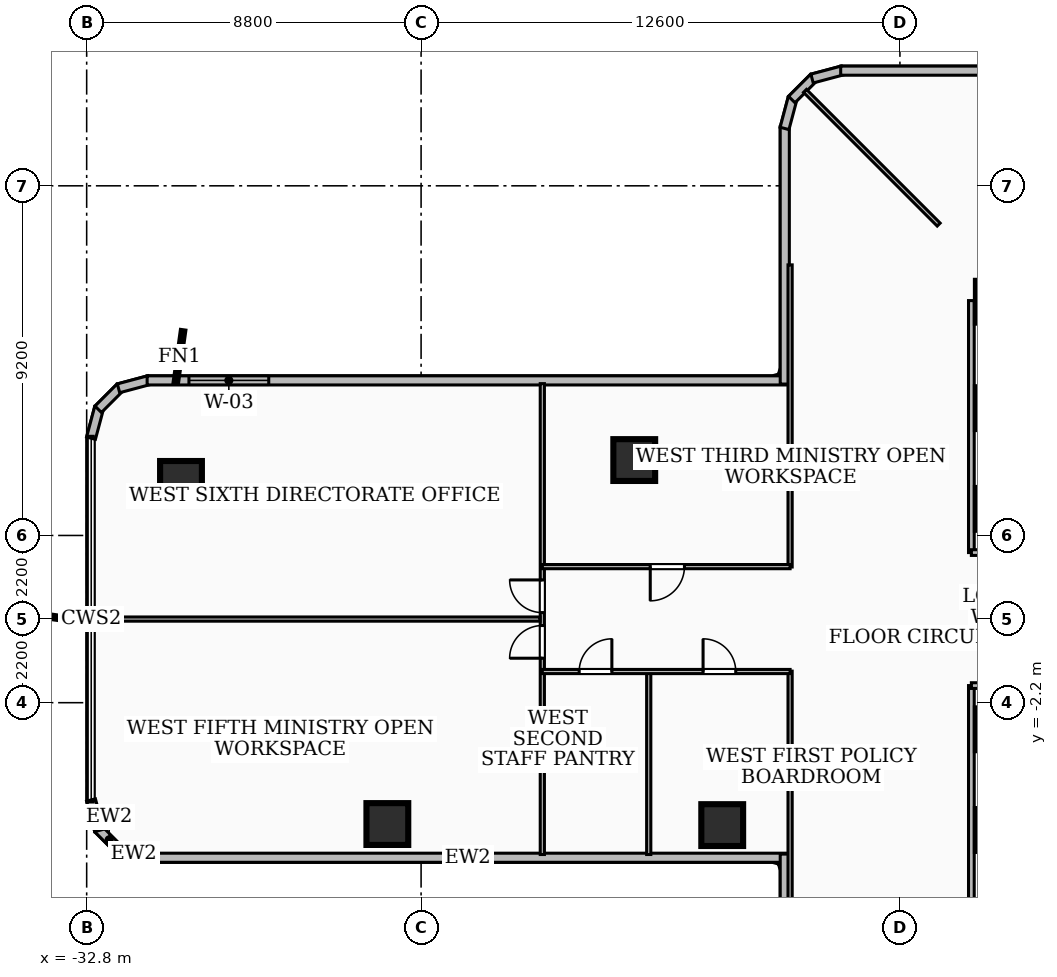
"""IFC4 building model, lengths in metres.
Left out: names, types, materials, properties, quantities, classifications, styles, units other than length and angle.
Written with IfcOpenShell. Run it as: python <this file> out.ifc"""

import sys

from ifc_helpers import new_model, si_unit, direction, frame, frame_2d, origin, origin_2d, place, context, subcontext, project, spatial, rectangle, extrude, element, fill, save


model = new_model("IFC4")
c1 = context("Model", 3, precision=1e-05, world=origin(), true_north=direction((0.0, 1.0)))
c2 = subcontext(c1, "Body", "Model", "MODEL_VIEW")
j1 = project(units=[si_unit("LENGTHUNIT", "METRE"), si_unit("PLANEANGLEUNIT", "RADIAN")], contexts=[c1])
p1 = place(None, origin())
s1 = spatial("IfcSite", under=j1, at=p1, CompositionType="ELEMENT")
p2 = place(p1, origin())
s2 = spatial("IfcBuilding", under=s1, at=p2, CompositionType="ELEMENT")
p3 = place(p2, frame((0.0, 0.0, 31.68)))
s3 = spatial("IfcBuildingStorey", under=s2, at=p3, CompositionType="ELEMENT", Elevation=31.68)
for number, where, z_axis, x_axis in (
    (1, (-8.85, -5.55, 0.0), (0.0, 0.0, 1.0), (1.0, 0.0, 0.0)),
    (2, (-8.85, -2.9, 0.0), (0.0, 0.0, 1.0), (1.0, 0.0, 0.0)),
    (3, (-8.85, 2.9, 0.0), (0.0, 0.0, 1.0), (1.0, 0.0, 0.0)),
    (4, (-8.85, 5.55, 0.0), (0.0, 0.0, 1.0), (1.0, 0.0, 0.0)),
    (5, (-8.85, 8.35, 0.0), (0.0, 0.0, 1.0), (1.0, 0.0, 0.0)),
    (6, (-18.391, 4.184, 0.0), (0.0, 0.0, 1.0), (1.0, 0.0, 0.0)),
    (7, (-16.076, -5.421, 0.0), (0.0, 0.0, 1.0), (1.0, 0.0, 0.0)),
    (8, (-30.318, 3.609, 0.0), (0.0, 0.0, 1.0), (1.0, 0.0, 0.0)),
    (9, (-24.888, -5.393, 0.0), (0.0, 0.0, 1.0), (1.0, 0.0, 0.0)),
):
    element("IfcColumn", number, at=place(p3, frame(where, z_axis=z_axis, x_axis=x_axis)), inside=s3, PredefinedType="COLUMN", context=c2, shape_type="SweptSolid", body=[
        extrude(rectangle(XDim=1.1, YDim=1.1, at=origin_2d()), origin(), (0.0, 0.0, 1.0), 3.6),
    ])
p4 = place(p3, frame((-14.334, -6.28, 0.0), z_axis=(0.0, 0.0, 1.0), x_axis=(-1.0, 0.0, 0.0)))
e10 = element("IfcWall", 10, at=p4, inside=s3, PredefinedType="SOLIDWALL", context=c2, shape_type="SweptSolid", body=[
    extrude(rectangle(XDim=16.875, YDim=0.24, at=frame_2d((8.438, 0.0))), origin(), (0.0, 0.0, 1.0), 2.644),
])
p5 = place(p3, frame((-31.16, -6.286, 0.0), z_axis=(0.0, 0.0, 1.0), x_axis=(-0.966234939601, 0.25766265056, 0.0)))
e11 = element("IfcWall", 11, at=p5, inside=s3, PredefinedType="SOLIDWALL", context=c2, shape_type="SweptSolid", body=[
    extrude(rectangle(XDim=0.83, YDim=0.24, at=frame_2d((0.415, 0.0))), origin(), (0.0, 0.0, 1.0), 3.34),
])
p6 = place(p3, frame((-31.92, -6.096, 0.0), z_axis=(0.0, 0.0, 1.0), x_axis=(-0.707256607812, 0.706956922808, 0.0)))
e12 = element("IfcWall", 12, at=p6, inside=s3, PredefinedType="SOLIDWALL", context=c2, shape_type="SweptSolid", body=[
    extrude(rectangle(XDim=0.815, YDim=0.24, at=frame_2d((0.407, 0.0))), origin(), (0.0, 0.0, 1.0), 3.34),
])
for number, where, z_axis, x_axis in (
    (13, (-32.472, -5.562, 0.0), (0.0, 0.0, 1.0), (-0.258, 0.966, 0.0)),
    (14, (-32.686, 4.76, 0.0), (0.0, 0.0, 1.0), (0.258, 0.966, 0.0)),
):
    element("IfcWall", number, at=place(p3, frame(where, z_axis=z_axis, x_axis=x_axis)), inside=s3, PredefinedType="SOLIDWALL", context=c2, shape_type="SweptSolid", body=[
        extrude(rectangle(XDim=0.83, YDim=0.24, at=frame_2d((0.415, 0.0))), origin(), (0.0, 0.0, 1.0), 3.34),
    ])
p7 = place(p3, frame((-32.496, 5.52, 0.0), z_axis=(0.0, 0.0, 1.0), x_axis=(0.707256607812, 0.706956922808, 0.0)))
e15 = element("IfcWall", 15, at=p7, inside=s3, PredefinedType="SOLIDWALL", context=c2, shape_type="SweptSolid", body=[
    extrude(rectangle(XDim=0.815, YDim=0.24, at=frame_2d((0.407, 0.0))), origin(), (0.0, 0.0, 1.0), 3.34),
])
p8 = place(p3, frame((-31.962, 6.072, 0.0), z_axis=(0.0, 0.0, 1.0), x_axis=(0.966234939601, 0.25766265056, 0.0)))
e16 = element("IfcWall", 16, at=p8, inside=s3, PredefinedType="SOLIDWALL", context=c2, shape_type="SweptSolid", body=[
    extrude(rectangle(XDim=0.83, YDim=0.24, at=frame_2d((0.415, 0.0))), origin(), (0.0, 0.0, 1.0), 3.34),
])
p9 = place(p3, frame((-31.209, 6.28, 0.0), z_axis=(0.0, 0.0, 1.0), x_axis=(1.0, 0.0, 0.0)))
e17 = element("IfcWall", 17, at=p9, inside=s3, PredefinedType="SOLIDWALL", context=c2, shape_type="SweptSolid", body=[
    extrude(rectangle(XDim=16.875, YDim=0.24, at=frame_2d((8.438, 0.0))), origin(), (0.0, 0.0, 1.0), 3.34),
])
p10 = place(p9, frame((1.1, 0.0, 0.85)))
e18 = element("IfcOpeningElement", 18, at=p10, cuts=e17, PredefinedType="OPENING", context=c2, shape_type="SweptSolid", body=[
    extrude(rectangle(XDim=2.1, YDim=2.0, at=frame_2d((1.05, 1.0))), frame((0.0, 0.13, 0.0), z_axis=(0.0, -1.0, 0.0), x_axis=(1.0, 0.0, 0.0)), (0.0, 0.0, 1.0), 0.26),
])
p11 = place(p3, frame((-14.43, 6.184, 0.0), z_axis=(0.0, 0.0, 1.0), x_axis=(0.0, 1.0, 0.0)))
e19 = element("IfcWall", 19, at=p11, inside=s3, PredefinedType="SOLIDWALL", context=c2, shape_type="SweptSolid", body=[
    extrude(rectangle(XDim=6.775, YDim=0.24, at=frame_2d((3.387, 0.0))), origin(), (0.0, 0.0, 1.0), 3.34),
])
p12 = place(p3, frame((-14.436, 12.91, 0.0), z_axis=(0.0, 0.0, 1.0), x_axis=(0.257937227116, 0.966161677396, 0.0)))
e20 = element("IfcWall", 20, at=p12, inside=s3, PredefinedType="SOLIDWALL", context=c2, shape_type="SweptSolid", body=[
    extrude(rectangle(XDim=0.83, YDim=0.24, at=frame_2d((0.415, 0.0))), origin(), (0.0, 0.0, 1.0), 3.34),
])
p13 = place(p3, frame((-14.246, 13.67, 0.0), z_axis=(0.0, 0.0, 1.0), x_axis=(0.707106781187, 0.707106781187, 0.0)))
e21 = element("IfcWall", 21, at=p13, inside=s3, PredefinedType="SOLIDWALL", context=c2, shape_type="SweptSolid", body=[
    extrude(rectangle(XDim=0.815, YDim=0.24, at=frame_2d((0.407, 0.0))), origin(), (0.0, 0.0, 1.0), 3.34),
])
p14 = place(p3, frame((-13.712, 14.222, 0.0), z_axis=(0.0, 0.0, 1.0), x_axis=(0.966161677396, 0.257937227116, 0.0)))
e22 = element("IfcWall", 22, at=p14, inside=s3, PredefinedType="SOLIDWALL", context=c2, shape_type="SweptSolid", body=[
    extrude(rectangle(XDim=0.83, YDim=0.24, at=frame_2d((0.415, 0.0))), origin(), (0.0, 0.0, 1.0), 3.34),
])
p15 = place(p3, frame((-12.959, 14.43, 0.0), z_axis=(0.0, 0.0, 1.0), x_axis=(1.0, 0.0, 0.0)))
e23 = element("IfcWall", 23, at=p15, inside=s3, PredefinedType="SOLIDWALL", context=c2, shape_type="SweptSolid", body=[
    extrude(rectangle(XDim=6.775, YDim=0.24, at=frame_2d((3.387, 0.0))), origin(), (0.0, 0.0, 1.0), 2.421),
])
p16 = place(p3, frame((-14.43, -12.959, 0.0), z_axis=(0.0, 0.0, 1.0), x_axis=(0.0, 1.0, 0.0)))
e24 = element("IfcWall", 24, at=p16, inside=s3, PredefinedType="SOLIDWALL", context=c2, shape_type="SweptSolid", body=[
    extrude(rectangle(XDim=6.775, YDim=0.24, at=frame_2d((3.387, 0.0))), origin(), (0.0, 0.0, 1.0), 2.644),
])
p17 = place(p3, frame((-9.52, 1.75, 0.0), z_axis=(0.0, 0.0, 1.0), x_axis=(0.0, 1.0, 0.0)))
e25 = element("IfcWall", 25, at=p17, inside=s3, PredefinedType="PARTITIONING", context=c2, shape_type="SweptSolid", body=[
    extrude(rectangle(XDim=6.63, YDim=0.15, at=frame_2d((3.315, 0.0))), origin(), (0.0, 0.0, 1.0), 2.421),
])
p18 = place(p3, frame((-7.85, 1.75, 0.0), z_axis=(0.0, 0.0, 1.0), x_axis=(-1.0, 0.0, 0.0)))
e26 = element("IfcWall", 26, at=p18, inside=s3, PredefinedType="PARTITIONING", context=c2, shape_type="SweptSolid", body=[
    extrude(rectangle(XDim=1.67, YDim=0.15, at=frame_2d((0.835, 0.0))), origin(), (0.0, 0.0, 1.0), 2.405),
])
p19 = place(p3, frame((-9.52, -8.38, 0.0), z_axis=(0.0, 0.0, 1.0), x_axis=(0.0, 1.0, 0.0)))
e27 = element("IfcWall", 27, at=p19, inside=s3, PredefinedType="PARTITIONING", context=c2, shape_type="SweptSolid", body=[
    extrude(rectangle(XDim=6.63, YDim=0.15, at=frame_2d((3.315, 0.0))), origin(), (0.0, 0.0, 1.0), 2.421),
])
p20 = place(p3, frame((-7.85, -1.75, 0.0), z_axis=(0.0, 0.0, 1.0), x_axis=(-1.0, 0.0, 0.0)))
e28 = element("IfcWall", 28, at=p20, inside=s3, PredefinedType="PARTITIONING", context=c2, shape_type="SweptSolid", body=[
    extrude(rectangle(XDim=1.67, YDim=0.15, at=frame_2d((0.835, 0.0))), origin(), (0.0, 0.0, 1.0), 2.405),
])
p21 = place(p3, frame((-10.38, 10.38, 0.0), z_axis=(0.0, 0.0, 1.0), x_axis=(-0.707106781187, 0.707106781187, 0.0)))
e29 = element("IfcWall", 29, at=p21, inside=s3, PredefinedType="PARTITIONING", context=c2, shape_type="SweptSolid", body=[
    extrude(rectangle(XDim=4.975, YDim=0.11, at=frame_2d((2.488, 0.0))), origin(), (0.0, 0.0, 1.0), 3.34),
])
for number, where, z_axis, x_axis in (
    (30, (-14.29, -1.37, 0.0), (0.0, 0.0, 1.0), (0.0, -1.0, 0.0)),
    (31, (-14.29, 9.32, 0.0), (0.0, 0.0, 1.0), (0.0, -1.0, 0.0)),
):
    element("IfcWall", number, at=place(p3, frame(where, z_axis=z_axis, x_axis=x_axis)), inside=s3, PredefinedType="PARTITIONING", context=c2, shape_type="SweptSolid", body=[
        extrude(rectangle(XDim=7.95, YDim=0.11, at=frame_2d((3.975, 0.0))), origin(), (0.0, 0.0, 1.0), 2.421),
    ])
p22 = place(p3, frame((-18.01, -1.4, 0.0), z_axis=(0.0, 0.0, 1.0), x_axis=(0.0, -1.0, 0.0)))
e32 = element("IfcWall", 32, at=p22, inside=s3, PredefinedType="PARTITIONING", context=c2, shape_type="SweptSolid", body=[
    extrude(rectangle(XDim=4.795, YDim=0.11, at=frame_2d((2.397, 0.0))), origin(), (0.0, 0.0, 1.0), 2.421),
])
p23 = place(p3, frame((-20.81, -1.38, 0.0), z_axis=(0.0, 0.0, 1.0), x_axis=(1.0, 0.0, 0.0)))
e33 = element("IfcWall", 33, at=p23, inside=s3, PredefinedType="PARTITIONING", context=c2, shape_type="SweptSolid", body=[
    extrude(rectangle(XDim=6.52, YDim=0.11, at=frame_2d((3.26, 0.0))), origin(), (0.0, 0.0, 1.0), 2.869),
])
p24 = place(p23, frame((4.23, 0.0, 0.0)))
e34 = element("IfcOpeningElement", 34, at=p24, cuts=e33, PredefinedType="OPENING", context=c2, shape_type="SweptSolid", body=[
    extrude(rectangle(XDim=0.86, YDim=2.04, at=frame_2d((0.43, 1.02))), frame((0.0, 0.065, 0.0), z_axis=(0.0, -1.0, 0.0), x_axis=(1.0, 0.0, 0.0)), (0.0, 0.0, 1.0), 0.13),
])
p25 = place(p23, frame((0.97, 0.0, 0.0)))
e35 = element("IfcOpeningElement", 35, at=p25, cuts=e33, PredefinedType="OPENING", context=c2, shape_type="SweptSolid", body=[
    extrude(rectangle(XDim=0.86, YDim=2.04, at=frame_2d((0.43, 1.02))), frame((0.0, 0.065, 0.0), z_axis=(0.0, -1.0, 0.0), x_axis=(1.0, 0.0, 0.0)), (0.0, 0.0, 1.0), 0.13),
])
p26 = place(p3, frame((-14.29, 1.38, 0.0), z_axis=(0.0, 0.0, 1.0), x_axis=(-1.0, 0.0, 0.0)))
e36 = element("IfcWall", 36, at=p26, inside=s3, PredefinedType="PARTITIONING", context=c2, shape_type="SweptSolid", body=[
    extrude(rectangle(XDim=6.52, YDim=0.11, at=frame_2d((3.26, 0.0))), origin(), (0.0, 0.0, 1.0), 2.869),
])
p27 = place(p26, frame((2.78, 0.0, 0.0)))
e37 = element("IfcOpeningElement", 37, at=p27, cuts=e36, PredefinedType="OPENING", context=c2, shape_type="SweptSolid", body=[
    extrude(rectangle(XDim=0.9, YDim=2.06, at=frame_2d((0.45, 1.03))), frame((0.0, 0.065, 0.0), z_axis=(0.0, -1.0, 0.0), x_axis=(1.0, 0.0, 0.0)), (0.0, 0.0, 1.0), 0.13),
])
p28 = place(p3, frame((-20.87, 0.0, 0.0), z_axis=(0.0, 0.0, 1.0), x_axis=(-1.0, 0.0, 0.0)))
e38 = element("IfcWall", 38, at=p28, inside=s3, PredefinedType="PARTITIONING", context=c2, shape_type="SweptSolid", body=[
    extrude(rectangle(XDim=11.725, YDim=0.11, at=frame_2d((5.862, 0.0))), origin(), (0.0, 0.0, 1.0), 2.72),
])
p29 = place(p3, frame((-20.81, -6.195, 0.0), z_axis=(0.0, 0.0, 1.0), x_axis=(0.0, 1.0, 0.0)))
e39 = element("IfcWall", 39, at=p29, inside=s3, PredefinedType="PARTITIONING", context=c2, shape_type="SweptSolid", body=[
    extrude(rectangle(XDim=12.39, YDim=0.11, at=frame_2d((6.195, 0.0))), origin(), (0.0, 0.0, 1.0), 2.421),
])
p30 = place(p29, frame((6.365, 0.0, 0.0)))
e40 = element("IfcOpeningElement", 40, at=p30, cuts=e39, PredefinedType="OPENING", context=c2, shape_type="SweptSolid", body=[
    extrude(rectangle(XDim=0.86, YDim=2.04, at=frame_2d((0.43, 1.02))), frame((0.0, 0.065, 0.0), z_axis=(0.0, -1.0, 0.0), x_axis=(1.0, 0.0, 0.0)), (0.0, 0.0, 1.0), 0.13),
])
p31 = place(p29, frame((5.165, 0.0, 0.0)))
e41 = element("IfcOpeningElement", 41, at=p31, cuts=e39, PredefinedType="OPENING", context=c2, shape_type="SweptSolid", body=[
    extrude(rectangle(XDim=0.86, YDim=2.04, at=frame_2d((0.43, 1.02))), frame((0.0, 0.065, 0.0), z_axis=(0.0, -1.0, 0.0), x_axis=(1.0, 0.0, 0.0)), (0.0, 0.0, 1.0), 0.13),
])
p32 = place(p10, origin())
e42 = element("IfcWindow", 42, at=p32, inside=s3, PartitioningType="SINGLE_PANEL", PredefinedType="WINDOW", context=c2, shape_type="SweptSolid", body=[
    extrude(rectangle(XDim=2.1, YDim=2.0, at=frame_2d((1.05, 1.0))), frame((0.0, 0.03, 0.0), z_axis=(0.0, -1.0, 0.0), x_axis=(1.0, 0.0, 0.0)), (0.0, 0.0, 1.0), 0.06),
])
fill(e18, e42)
p33 = place(p24, origin())
e43 = element("IfcDoor", 43, at=p33, inside=s3, OperationType="SINGLE_SWING_LEFT", PredefinedType="DOOR", context=c2, shape_type="SweptSolid", body=[
    extrude(rectangle(XDim=0.86, YDim=2.04, at=frame_2d((0.43, 1.02))), frame((0.0, 0.025, 0.0), z_axis=(0.0, -1.0, 0.0), x_axis=(1.0, 0.0, 0.0)), (0.0, 0.0, 1.0), 0.05),
])
fill(e34, e43)
p34 = place(p25, origin())
e44 = element("IfcDoor", 44, at=p34, inside=s3, OperationType="SINGLE_SWING_RIGHT", PredefinedType="DOOR", context=c2, shape_type="SweptSolid", body=[
    extrude(rectangle(XDim=0.86, YDim=2.04, at=frame_2d((0.43, 1.02))), frame((0.0, 0.025, 0.0), z_axis=(0.0, -1.0, 0.0), x_axis=(1.0, 0.0, 0.0)), (0.0, 0.0, 1.0), 0.05),
])
fill(e35, e44)
p35 = place(p27, origin())
e45 = element("IfcDoor", 45, at=p35, inside=s3, OperationType="SINGLE_SWING_RIGHT", PredefinedType="DOOR", context=c2, shape_type="SweptSolid", body=[
    extrude(rectangle(XDim=0.9, YDim=2.06, at=frame_2d((0.45, 1.03))), frame((0.0, 0.025, 0.0), z_axis=(0.0, -1.0, 0.0), x_axis=(1.0, 0.0, 0.0)), (0.0, 0.0, 1.0), 0.05),
])
fill(e37, e45)
p36 = place(p30, origin())
e46 = element("IfcDoor", 46, at=p36, inside=s3, OperationType="SINGLE_SWING_RIGHT", PredefinedType="DOOR", context=c2, shape_type="SweptSolid", body=[
    extrude(rectangle(XDim=0.86, YDim=2.04, at=frame_2d((0.43, 1.02))), frame((0.0, 0.025, 0.0), z_axis=(0.0, -1.0, 0.0), x_axis=(1.0, 0.0, 0.0)), (0.0, 0.0, 1.0), 0.05),
])
fill(e40, e46)
p37 = place(p31, origin())
e47 = element("IfcDoor", 47, at=p37, inside=s3, OperationType="SINGLE_SWING_LEFT", PredefinedType="DOOR", context=c2, shape_type="SweptSolid", body=[
    extrude(rectangle(XDim=0.86, YDim=2.04, at=frame_2d((0.43, 1.02))), frame((0.0, 0.025, 0.0), z_axis=(0.0, -1.0, 0.0), x_axis=(1.0, 0.0, 0.0)), (0.0, 0.0, 1.0), 0.05),
])
fill(e41, e47)
save(model, sys.argv[1])
